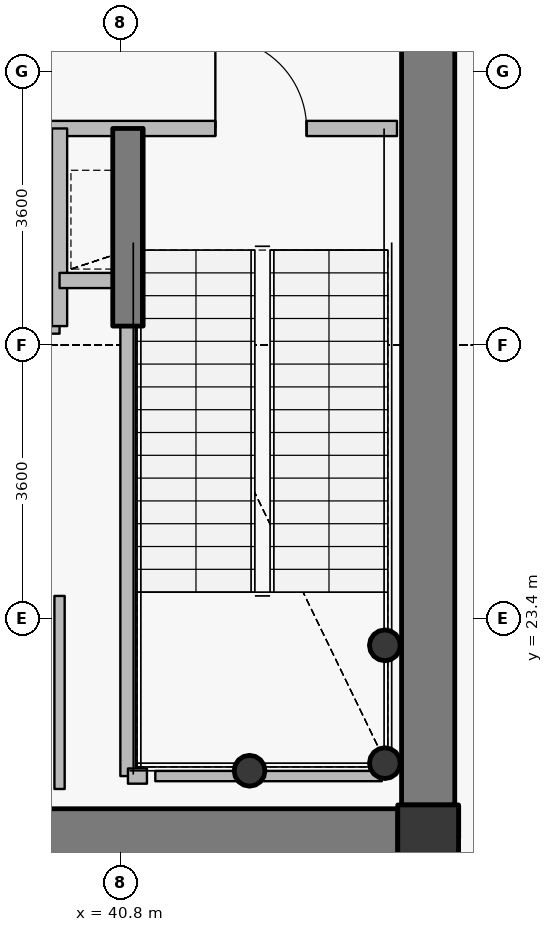
"""IFC4 building model, lengths in metres.
Left out: names, types, materials, properties, quantities, classifications, styles, units other than length and angle.
Written with IfcOpenShell. Run it as: python <this file> out.ifc"""

import sys

from ifc_helpers import new_model, si_unit, direction, frame, frame_2d, origin, origin_2d, place, context, subcontext, project, spatial, rectangle, hollow_circle, extrude, source, transform, mapped, element, fill, save


model = new_model("IFC4")
c1 = context("Model", 3, precision=1e-05, world=origin(), true_north=direction((0.0, 1.0)))
c2 = subcontext(c1, "Body", "Model", "MODEL_VIEW")
j1 = project(units=[si_unit("LENGTHUNIT", "METRE"), si_unit("PLANEANGLEUNIT", "RADIAN")], contexts=[c1])
p1 = place(None, origin())
s1 = spatial("IfcSite", under=j1, at=p1, CompositionType="ELEMENT")
p2 = place(p1, origin())
s2 = spatial("IfcBuilding", under=s1, at=p2, CompositionType="ELEMENT")
p3 = place(p2, frame((0.0, 0.0, 368.4)))
s3 = spatial("IfcBuildingStorey", under=s2, at=p3, CompositionType="ELEMENT", Elevation=368.4)
p4 = place(p3, frame((44.85, 20.55, 0.0), z_axis=(0.0, 0.0, 1.0), x_axis=(1.0, 0.0, 0.0)))
e1 = element("IfcColumn", 1, at=p4, inside=s3, PredefinedType="COLUMN", context=c2, shape_type="SweptSolid", body=[
    extrude(rectangle(XDim=0.8, YDim=0.8, at=origin_2d()), origin(), (0.0, 0.0, 1.0), 4.8),
])
for number, where, z_axis, x_axis in (
    (2, (44.28, 21.5, 0.0), (0.0, 0.0, 1.0), (1.0, 0.0, 0.0)),
    (3, (44.28, 23.05, 0.0), (0.0, 0.0, 1.0), (1.0, 0.0, 0.0)),
    (4, (42.5, 21.4, 0.0), (0.0, 0.0, 1.0), (1.0, 0.0, 0.0)),
):
    element("IfcColumn", number, at=place(p3, frame(where, z_axis=z_axis, x_axis=x_axis)), inside=s3, PredefinedType="COLUMN", context=c2, shape_type="SweptSolid", body=[
        extrude(hollow_circle(Radius=0.203, WallThickness=0.016, at=origin_2d()), origin(), (0.0, 0.0, 1.0), 4.8),
    ])
p5 = place(p3, frame((44.85, 33.05, 0.0), z_axis=(0.0, 0.0, 1.0), x_axis=(0.0, -1.0, 0.0)))
e5 = element("IfcWall", 5, at=p5, inside=s3, PredefinedType="SHEAR", context=c2, shape_type="SweptSolid", body=[
    extrude(rectangle(XDim=12.1, YDim=0.7, at=frame_2d((6.05, 0.0))), origin(), (0.0, 0.0, 1.0), 4.05),
])
p6 = place(p3, frame((44.45, 20.55, 0.0), z_axis=(0.0, 0.0, 1.0), x_axis=(-1.0, 0.0, 0.0)))
e6 = element("IfcWall", 6, at=p6, inside=s3, PredefinedType="SHEAR", context=c2, shape_type="SweptSolid", body=[
    extrude(rectangle(XDim=16.9, YDim=0.7, at=frame_2d((8.45, 0.0))), origin(), (0.0, 0.0, 1.0), 4.05),
])
p7 = place(p6, frame((13.075, 0.0, 0.0)))
e7 = element("IfcOpeningElement", 7, at=p7, cuts=e6, PredefinedType="OPENING", context=c2, shape_type="SweptSolid", body=[
    extrude(rectangle(XDim=1.15, YDim=2.15, at=origin_2d()), frame((0.575, 0.36, 1.075), z_axis=(0.0, -1.0, 0.0), x_axis=(1.0, 0.0, 0.0)), (0.0, 0.0, 1.0), 0.72),
])
p8 = place(p6, frame((9.2, 0.0, 0.0)))
e8 = element("IfcOpeningElement", 8, at=p8, cuts=e6, PredefinedType="OPENING", context=c2, shape_type="SweptSolid", body=[
    extrude(rectangle(XDim=1.15, YDim=2.15, at=origin_2d()), frame((0.575, 0.36, 1.075), z_axis=(0.0, -1.0, 0.0), x_axis=(1.0, 0.0, 0.0)), (0.0, 0.0, 1.0), 0.72),
])
p9 = place(p3, frame((40.9, 27.25, 0.0), z_axis=(0.0, 0.0, 1.0), x_axis=(0.0, 1.0, 0.0)))
e9 = element("IfcWall", 9, at=p9, inside=s3, PredefinedType="SHEAR", context=c2, shape_type="SweptSolid", body=[
    extrude(rectangle(XDim=2.6, YDim=0.4, at=frame_2d((1.3, 0.0))), origin(), (0.0, 0.0, 1.0), 4.1),
])
p10 = place(p3, frame((35.95, 29.85, 0.0), z_axis=(0.0, 0.0, 1.0), x_axis=(1.0, 0.0, 0.0)))
e10 = element("IfcWall", 10, at=p10, inside=s3, PredefinedType="PARTITIONING", context=c2, shape_type="SweptSolid", body=[
    extrude(rectangle(XDim=8.49, YDim=0.2, at=frame_2d((4.245, 0.0))), origin(), (0.0, 0.0, 1.0), 4.085),
])
p11 = place(p10, frame((6.1, 0.0, 0.0)))
e11 = element("IfcOpeningElement", 11, at=p11, cuts=e10, PredefinedType="OPENING", context=c2, shape_type="SweptSolid", body=[
    extrude(rectangle(XDim=1.2, YDim=2.15, at=origin_2d()), frame((0.6, 0.11, 1.075), z_axis=(0.0, -1.0, 0.0), x_axis=(1.0, 0.0, 0.0)), (0.0, 0.0, 1.0), 0.22),
])
p12 = place(p10, frame((0.37, 0.0, 0.0)))
e12 = element("IfcOpeningElement", 12, at=p12, cuts=e10, PredefinedType="OPENING", context=c2, shape_type="SweptSolid", body=[
    extrude(rectangle(XDim=1.15, YDim=2.15, at=origin_2d()), frame((0.575, 0.11, 1.075), z_axis=(0.0, -1.0, 0.0), x_axis=(1.0, 0.0, 0.0)), (0.0, 0.0, 1.0), 0.22),
])
p13 = place(p10, frame((2.425, 0.0, 0.0)))
e13 = element("IfcOpeningElement", 13, at=p13, cuts=e10, PredefinedType="OPENING", context=c2, shape_type="SweptSolid", body=[
    extrude(rectangle(XDim=1.05, YDim=2.15, at=origin_2d()), frame((0.525, 0.11, 1.075), z_axis=(0.0, -1.0, 0.0), x_axis=(1.0, 0.0, 0.0)), (0.0, 0.0, 1.0), 0.22),
])
p14 = place(p3, frame((39.8, 27.25, 0.0), z_axis=(0.0, 0.0, 1.0), x_axis=(1.0, 0.0, 0.0)))
e14 = element("IfcWall", 14, at=p14, inside=s3, PredefinedType="PARTITIONING", context=c2, shape_type="SweptSolid", body=[
    extrude(rectangle(XDim=0.2, YDim=0.2, at=frame_2d((0.1, 0.0))), origin(), (0.0, 0.0, 1.0), 4.5),
])
p15 = place(p3, frame((40.0, 27.25, 0.0), z_axis=(0.0, 0.0, 1.0), x_axis=(0.0, 1.0, 0.0)))
e15 = element("IfcWall", 15, at=p15, inside=s3, PredefinedType="PARTITIONING", context=c2, shape_type="SweptSolid", body=[
    extrude(rectangle(XDim=2.6, YDim=0.2, at=frame_2d((1.3, 0.0))), origin(), (0.0, 0.0, 1.0), 4.5),
])
p16 = place(p3, frame((40.0, 27.85, 0.0), z_axis=(0.0, 0.0, 1.0), x_axis=(1.0, 0.0, 0.0)))
e16 = element("IfcWall", 16, at=p16, inside=s3, PredefinedType="PARTITIONING", context=c2, shape_type="SweptSolid", body=[
    extrude(rectangle(XDim=0.9, YDim=0.2, at=frame_2d((0.45, 0.0))), origin(), (0.0, 0.0, 1.0), 4.5),
])
p17 = place(p3, frame((40.9, 21.33, 0.0), z_axis=(0.0, 0.0, 1.0), x_axis=(0.0, 1.0, 0.0)))
e17 = element("IfcWall", 17, at=p17, inside=s3, PredefinedType="PARTITIONING", context=c2, shape_type="SweptSolid", body=[
    extrude(rectangle(XDim=5.91, YDim=0.2, at=frame_2d((2.955, 0.0))), origin(), (0.0, 0.0, 1.0), 4.035),
])
p18 = place(p3, frame((40.9, 21.33, 0.0), z_axis=(0.0, 0.0, 1.0), x_axis=(1.0, 0.0, 0.0)))
e18 = element("IfcWall", 18, at=p18, inside=s3, PredefinedType="PARTITIONING", context=c2, shape_type="SweptSolid", body=[
    extrude(rectangle(XDim=0.25, YDim=0.2, at=frame_2d((0.125, 0.0))), origin(), (0.0, 0.0, 1.0), 4.035),
])
p19 = place(p3, frame((44.24, 21.33, 0.0), z_axis=(0.0, 0.0, 1.0), x_axis=(-1.0, 0.0, 0.0)))
e19 = element("IfcWall", 19, at=p19, inside=s3, PredefinedType="PARTITIONING", context=c2, shape_type="SweptSolid", body=[
    extrude(rectangle(XDim=2.98, YDim=0.135, at=frame_2d((1.49, 0.0))), origin(), (0.0, 0.0, 1.0), 4.035),
])
p20 = place(p3, frame((40.0, 23.7, 0.0), z_axis=(0.0, 0.0, 1.0), x_axis=(0.0, -1.0, 0.0)))
e20 = element("IfcWall", 20, at=p20, inside=s3, PredefinedType="PARTITIONING", context=c2, shape_type="SweptSolid", body=[
    extrude(rectangle(XDim=2.54, YDim=0.135, at=frame_2d((1.27, 0.0))), origin(), (0.0, 0.0, 1.0), 4.035),
])
p21 = place(p3, frame((45.2, 20.508, 0.0), z_axis=(0.0, 0.0, 1.0), x_axis=(0.0, 1.0, 0.0)))
e21 = element("IfcWall", 21, at=p21, inside=s3, PredefinedType="PARTITIONING", context=c2, shape_type="SweptSolid", body=[
    extrude(rectangle(XDim=0.432, YDim=0.135, at=frame_2d((0.216, 0.0))), origin(), (0.0, 0.0, 1.0), 3.985),
])
m1 = source(origin(), c2, "Body", "SweptSolid", [
    extrude(rectangle(XDim=1.2, YDim=2.15, at=origin_2d()), frame((0.6, 0.025, 1.075), z_axis=(0.0, -1.0, 0.0), x_axis=(1.0, 0.0, 0.0)), (0.0, 0.0, 1.0), 0.05),
])
p22 = place(p11, origin())
e22 = element("IfcDoor", 22, at=p22, inside=s3, OperationType="SINGLE_SWING_LEFT", PredefinedType="DOOR", context=c2, shape_type="MappedRepresentation", body=[
    mapped(m1, transform((0.0, 0.0, 0.0), x_axis=(1.0, 0.0, 0.0), y_axis=(0.0, 1.0, 0.0), z_axis=(0.0, 0.0, 1.0), scale=1.0)),
])
fill(e11, e22)
save(model, sys.argv[1])
